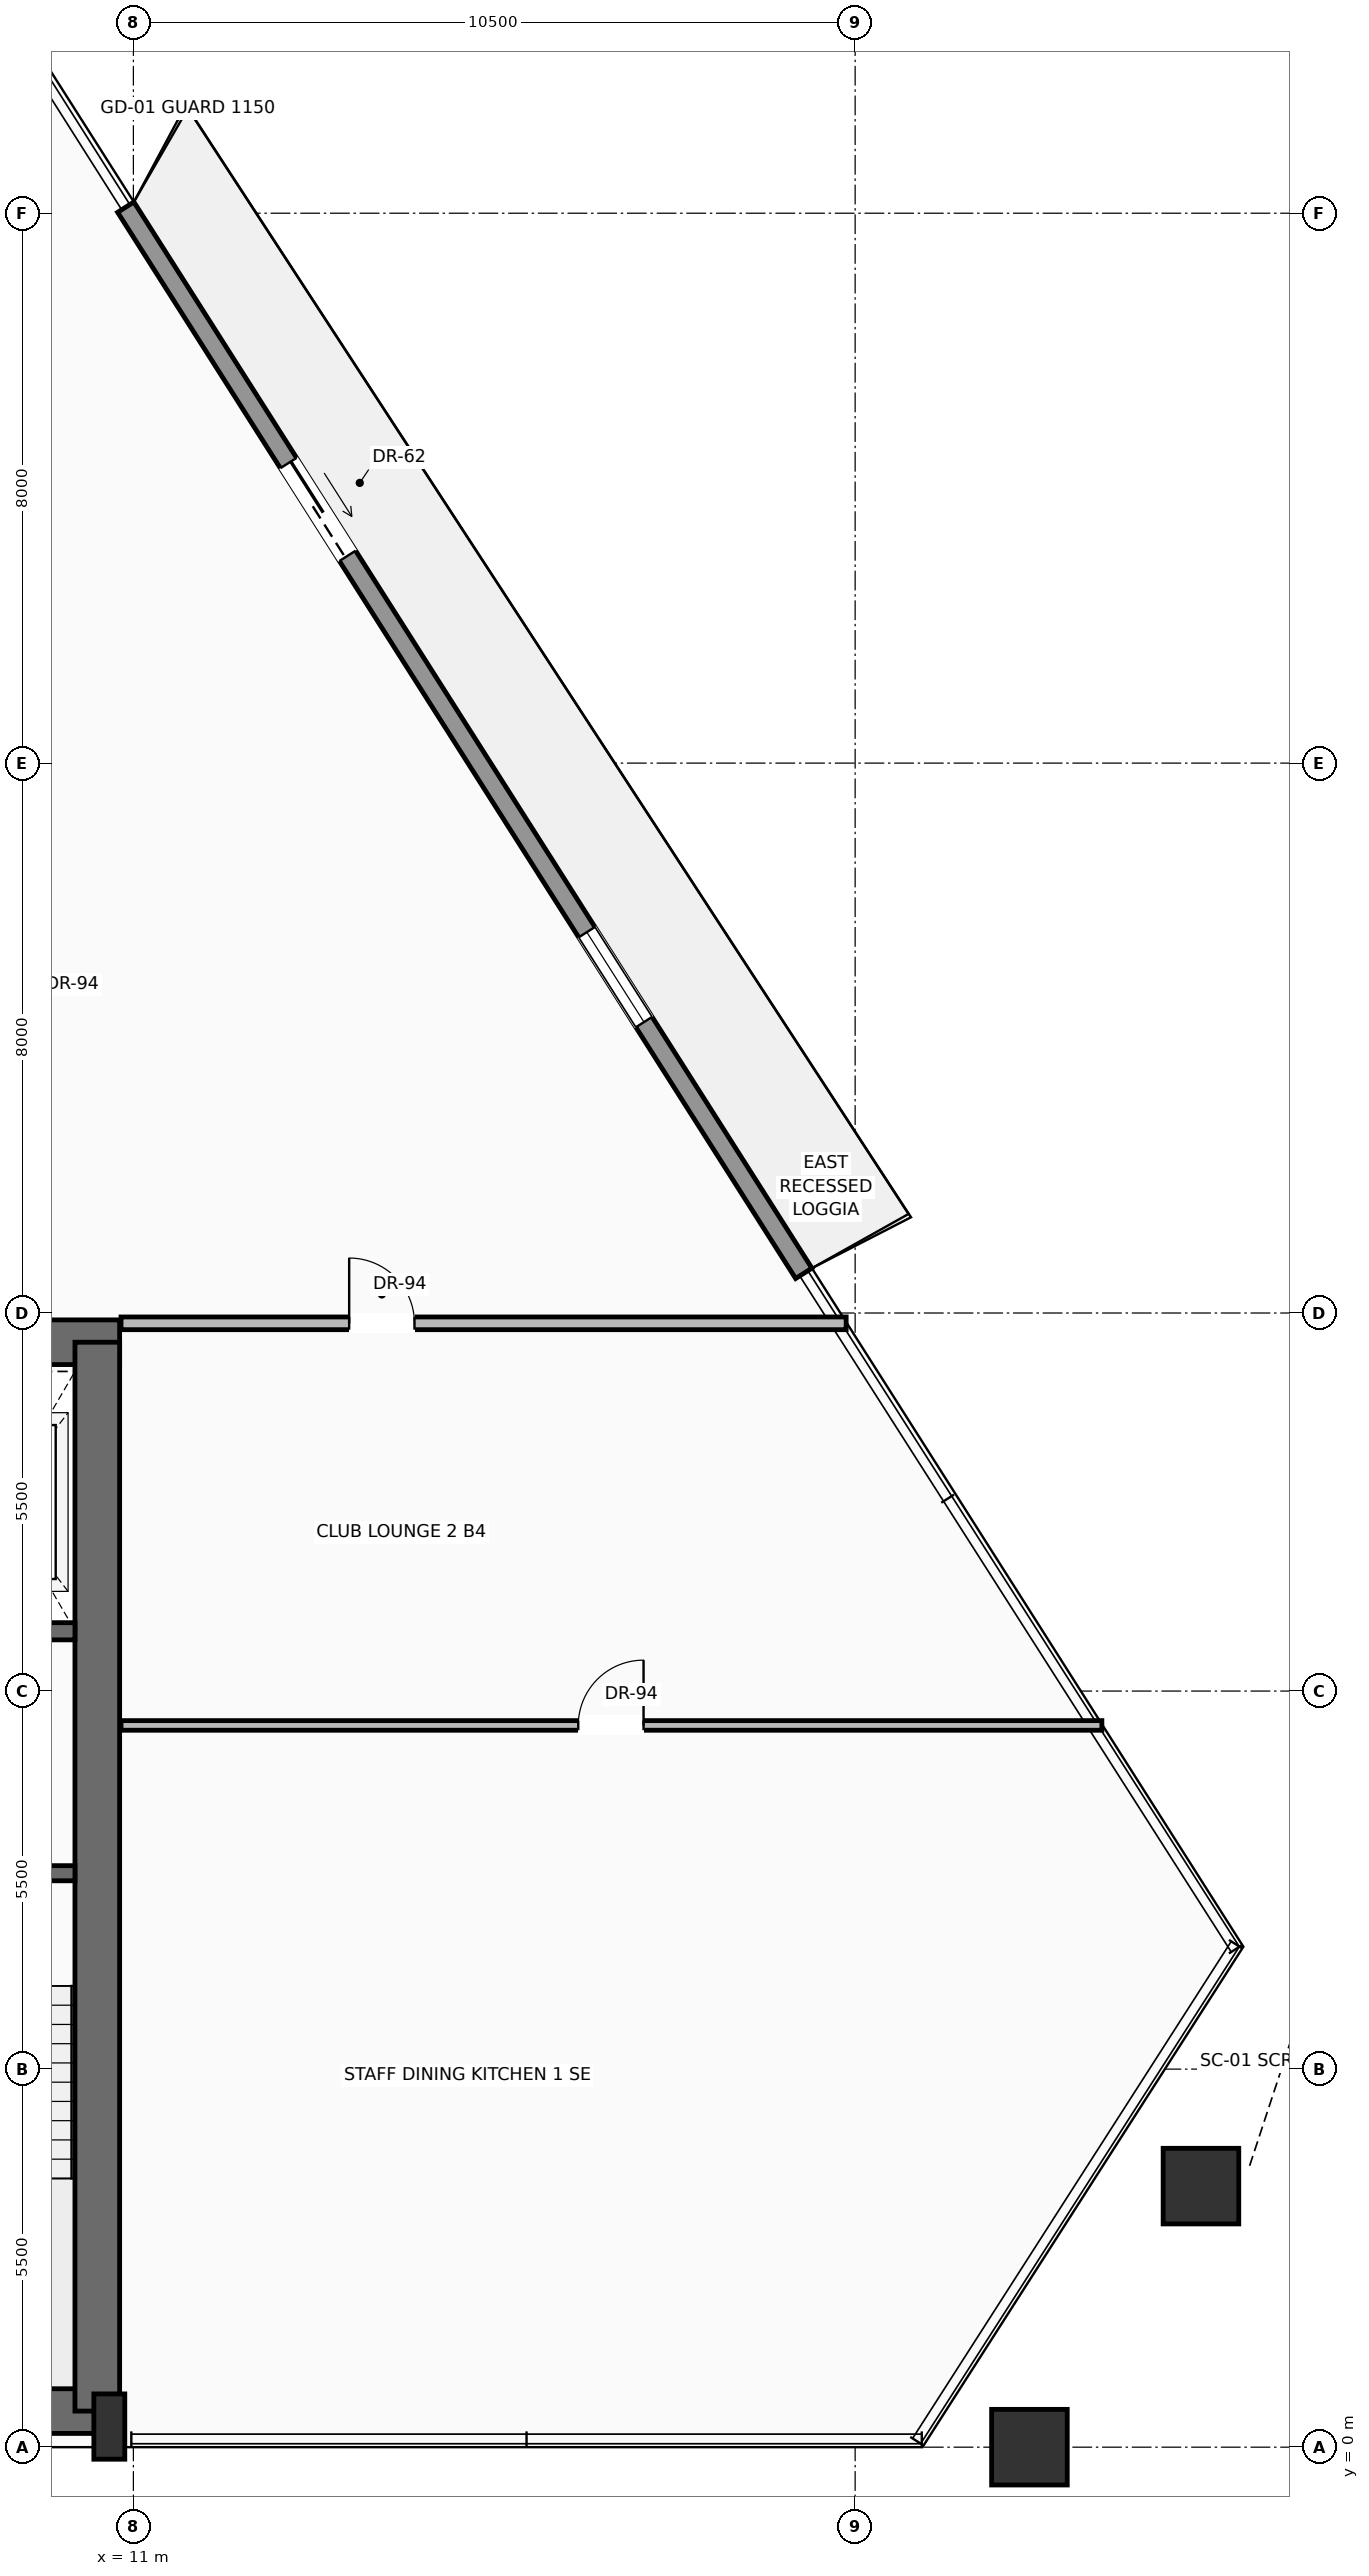
"""IFC4 building model, lengths in metres.
Left out: names, types, materials, properties, quantities, classifications, styles, units other than length and angle.
Written with IfcOpenShell. Run it as: python <this file> out.ifc"""

import sys

from ifc_helpers import new_model, si_unit, direction, frame, frame_2d, origin, origin_2d, place, context, subcontext, project, spatial, rectangle, hollow_rectangle, extrude, source, transform, mapped, element, fill, save


model = new_model("IFC4")
c1 = context("Model", 3, precision=1e-05, world=origin(), true_north=direction((0.0, 1.0)))
c2 = subcontext(c1, "Body", "Model", "MODEL_VIEW")
j1 = project(units=[si_unit("LENGTHUNIT", "METRE"), si_unit("PLANEANGLEUNIT", "RADIAN")], contexts=[c1])
p1 = place(None, origin())
s1 = spatial("IfcSite", under=j1, at=p1, CompositionType="ELEMENT")
p2 = place(p1, origin())
s2 = spatial("IfcBuilding", under=s1, at=p2, CompositionType="ELEMENT")
p3 = place(p2, frame((0.0, 0.0, 155.2)))
s3 = spatial("IfcBuildingStorey", under=s2, at=p3, CompositionType="ELEMENT", Elevation=155.2)
p4 = place(p3, frame((-10.65, 0.525, 0.0), z_axis=(0.0, 0.0, 1.0), x_axis=(1.0, 0.0, 0.0)))
e1 = element("IfcWall", 1, at=p4, inside=s3, PredefinedType="SHEAR", context=c2, shape_type="SweptSolid", body=[
    extrude(rectangle(XDim=21.3, YDim=0.65, at=frame_2d((10.65, 0.0))), origin(), (0.0, 0.0, 1.0), 3.47),
])
p5 = place(p3, frame((-10.8, 16.075, 0.0), z_axis=(0.0, 0.0, 1.0), x_axis=(1.0, 0.0, 0.0)))
e2 = element("IfcWall", 2, at=p5, inside=s3, PredefinedType="SHEAR", context=c2, shape_type="SweptSolid", body=[
    extrude(rectangle(XDim=21.6, YDim=0.65, at=frame_2d((10.8, 0.0))), origin(), (0.0, 0.0, 1.0), 3.47),
])
p6 = place(p5, frame((3.37, 0.0, 0.0)))
e3 = element("IfcOpeningElement", 3, at=p6, cuts=e2, PredefinedType="OPENING", context=c2, shape_type="SweptSolid", body=[
    extrude(rectangle(XDim=1.3, YDim=2.3, at=frame_2d((0.65, 1.15))), frame((0.0, 0.335, 0.0), z_axis=(0.0, -1.0, 0.0), x_axis=(1.0, 0.0, 0.0)), (0.0, 0.0, 1.0), 0.67),
])
p7 = place(p5, frame((9.8, 0.0, 0.0)))
e4 = element("IfcOpeningElement", 4, at=p7, cuts=e2, PredefinedType="OPENING", context=c2, shape_type="SweptSolid", body=[
    extrude(rectangle(XDim=2.0, YDim=2.4, at=frame_2d((1.0, 1.2))), frame((0.0, 0.335, 0.0), z_axis=(0.0, -1.0, 0.0), x_axis=(1.0, 0.0, 0.0)), (0.0, 0.0, 1.0), 0.67),
])
p8 = place(p3, frame((10.475, 0.525, 0.0), z_axis=(0.0, 0.0, 1.0), x_axis=(0.0, 1.0, 0.0)))
e5 = element("IfcWall", 5, at=p8, inside=s3, PredefinedType="SHEAR", context=c2, shape_type="SweptSolid", body=[
    extrude(rectangle(XDim=15.55, YDim=0.65, at=frame_2d((7.775, 0.0))), origin(), (0.0, 0.0, 1.0), 3.47),
])
m1 = source(origin(), c2, "Body", "SweptSolid", [
    extrude(rectangle(XDim=0.45, YDim=0.95, at=origin_2d()), origin(), (0.0, 0.0, 1.0), 3.7),
])
p9 = place(p3, frame((10.65, 0.3, 0.0), z_axis=(0.0, 0.0, 1.0), x_axis=(1.0, 0.0, 0.0)))
e6 = element("IfcColumn", 6, at=p9, inside=s3, PredefinedType="PILASTER", context=c2, shape_type="MappedRepresentation", body=[
    mapped(m1, transform((0.0, 0.0, 0.0), scale=1.0)),
])
m2 = source(origin(), c2, "Body", "SweptSolid", [
    extrude(hollow_rectangle(XDim=1.1, YDim=1.1, WallThickness=0.055, at=origin_2d()), origin(), (0.0, 0.0, 1.0), 3.691),
])
p10 = place(p3, frame((24.035, 0.0, 0.004), z_axis=(0.007672239294, 0.0, 0.999970567939), x_axis=(0.0, 1.0, 0.0)))
e7 = element("IfcColumn", 7, at=p10, inside=s3, PredefinedType="COLUMN", context=c2, shape_type="MappedRepresentation", body=[
    mapped(m2, transform((0.0, 0.0, 0.0), scale=1.0)),
])
m3 = source(origin(), c2, "Body", "SweptSolid", [
    extrude(hollow_rectangle(XDim=1.1, YDim=1.1, WallThickness=0.055, at=origin_2d()), origin(), (0.0, 0.0, 1.0), 3.692),
])
p11 = place(p3, frame((26.531, 3.798, 0.004), z_axis=(-0.004629359862, -0.015078486406, 0.999875596399), x_axis=(0.955960137676, -0.293496533497, 0.0)))
e8 = element("IfcColumn", 8, at=p11, inside=s3, PredefinedType="COLUMN", context=c2, shape_type="MappedRepresentation", body=[
    mapped(m3, transform((0.0, 0.0, 0.0), scale=1.0)),
])
p12 = place(p3, frame((10.889, 32.588, 0.0), z_axis=(0.0, 0.0, 1.0), x_axis=(0.536603894372, -0.8438342613, 0.0)))
e9 = element("IfcWall", 9, at=p12, inside=s3, PredefinedType="SOLIDWALL", context=c2, shape_type="SweptSolid", body=[
    extrude(rectangle(XDim=18.382, YDim=0.28, at=frame_2d((9.191, 0.0))), origin(), (0.0, 0.0, 1.0), 3.05),
])
p13 = place(p12, frame((4.412, 0.0, 0.0)))
e10 = element("IfcOpeningElement", 10, at=p13, cuts=e9, PredefinedType="OPENING", context=c2, shape_type="SweptSolid", body=[
    extrude(rectangle(XDim=1.6, YDim=2.35, at=frame_2d((0.8, 1.175))), frame((0.0, 0.15, 0.0), z_axis=(0.0, -1.0, 0.0), x_axis=(1.0, 0.0, 0.0)), (0.0, 0.0, 1.0), 0.3),
])
p14 = place(p12, frame((12.5, 0.0, 0.9)))
e11 = element("IfcOpeningElement", 11, at=p14, cuts=e9, PredefinedType="OPENING", context=c2, shape_type="SweptSolid", body=[
    extrude(rectangle(XDim=1.55, YDim=1.85, at=frame_2d((0.775, 0.925))), frame((0.0, 0.15, 0.0), z_axis=(0.0, -1.0, 0.0), x_axis=(1.0, 0.0, 0.0)), (0.0, 0.0, 1.0), 0.3),
])
p15 = place(p3, frame((10.15, 8.35, 0.0), z_axis=(0.0, 0.0, 1.0), x_axis=(-1.0, 0.0, 0.0)))
e12 = element("IfcWall", 12, at=p15, inside=s3, PredefinedType="SOLIDWALL", context=c2, shape_type="SweptSolid", body=[
    extrude(rectangle(XDim=4.65, YDim=0.22, at=frame_2d((2.325, 0.0))), origin(), (0.0, 0.0, 1.0), 3.47),
])
p16 = place(p15, frame((1.0, 0.0, 0.0)))
e13 = element("IfcOpeningElement", 13, at=p16, cuts=e12, PredefinedType="OPENING", context=c2, shape_type="SweptSolid", body=[
    extrude(rectangle(XDim=1.15, YDim=2.2, at=frame_2d((0.575, 1.1))), frame((0.0, 0.12, 0.0), z_axis=(0.0, -1.0, 0.0), x_axis=(1.0, 0.0, 0.0)), (0.0, 0.0, 1.0), 0.24),
])
p17 = place(p3, frame((10.15, 11.87, 0.0), z_axis=(0.0, 0.0, 1.0), x_axis=(-1.0, 0.0, 0.0)))
e14 = element("IfcWall", 14, at=p17, inside=s3, PredefinedType="SOLIDWALL", context=c2, shape_type="SweptSolid", body=[
    extrude(rectangle(XDim=4.65, YDim=0.25, at=frame_2d((2.325, 0.0))), origin(), (0.0, 0.0, 1.0), 3.47),
])
p18 = place(p17, frame((0.5, 0.0, 0.0)))
e15 = element("IfcOpeningElement", 15, at=p18, cuts=e14, PredefinedType="OPENING", context=c2, shape_type="SweptSolid", body=[
    extrude(rectangle(XDim=1.2, YDim=2.25, at=frame_2d((0.6, 1.125))), frame((0.0, 0.135, 0.0), z_axis=(0.0, -1.0, 0.0), x_axis=(1.0, 0.0, 0.0)), (0.0, 0.0, 1.0), 0.27),
])
p19 = place(p3, frame((10.82, 16.35, 0.0), z_axis=(0.0, 0.0, 1.0), x_axis=(1.0, 0.0, 0.0)))
e16 = element("IfcWall", 16, at=p19, inside=s3, PredefinedType="PARTITIONING", context=c2, shape_type="SweptSolid", body=[
    extrude(rectangle(XDim=10.549, YDim=0.185, at=frame_2d((5.274, 0.0))), origin(), (0.0, 0.0, 1.0), 3.462),
])
p20 = place(p19, frame((3.319, 0.0, 0.0)))
e17 = element("IfcOpeningElement", 17, at=p20, cuts=e16, PredefinedType="OPENING", context=c2, shape_type="SweptSolid", body=[
    extrude(rectangle(XDim=0.95, YDim=2.2, at=frame_2d((0.475, 1.1))), frame((0.0, 0.103, 0.0), z_axis=(0.0, -1.0, 0.0), x_axis=(1.0, 0.0, 0.0)), (0.0, 0.0, 1.0), 0.205),
])
p21 = place(p3, frame((10.82, 10.5, 0.0), z_axis=(0.0, 0.0, 1.0), x_axis=(1.0, 0.0, 0.0)))
e18 = element("IfcWall", 18, at=p21, inside=s3, PredefinedType="PARTITIONING", context=c2, shape_type="SweptSolid", body=[
    extrude(rectangle(XDim=14.269, YDim=0.14, at=frame_2d((7.135, 0.0))), origin(), (0.0, 0.0, 1.0), 3.462),
])
p22 = place(p21, frame((6.652, 0.0, 0.0)))
e19 = element("IfcOpeningElement", 19, at=p22, cuts=e18, PredefinedType="OPENING", context=c2, shape_type="SweptSolid", body=[
    extrude(rectangle(XDim=0.95, YDim=2.2, at=frame_2d((0.475, 1.1))), frame((0.0, 0.08, 0.0), z_axis=(0.0, -1.0, 0.0), x_axis=(1.0, 0.0, 0.0)), (0.0, 0.0, 1.0), 0.16),
])
m4 = source(origin(), c2, "Body", "SweptSolid", [
    extrude(rectangle(XDim=1.6, YDim=2.35, at=frame_2d((0.8, 1.175))), frame((0.0, 0.025, 0.0), z_axis=(0.0, -1.0, 0.0), x_axis=(1.0, 0.0, 0.0)), (0.0, 0.0, 1.0), 0.05),
])
p23 = place(p13, origin())
e20 = element("IfcDoor", 20, at=p23, inside=s3, OperationType="SLIDING_TO_RIGHT", PredefinedType="DOOR", context=c2, shape_type="MappedRepresentation", body=[
    mapped(m4, transform((0.0, 0.0, 0.0), scale=1.0)),
])
fill(e10, e20)
m5 = source(origin(), c2, "Body", "SweptSolid", [
    extrude(rectangle(XDim=1.55, YDim=1.85, at=frame_2d((0.775, 0.925))), frame((0.0, 0.03, 0.0), z_axis=(0.0, -1.0, 0.0), x_axis=(1.0, 0.0, 0.0)), (0.0, 0.0, 1.0), 0.06),
])
p24 = place(p14, origin())
e21 = element("IfcWindow", 21, at=p24, inside=s3, PartitioningType="SINGLE_PANEL", PredefinedType="WINDOW", context=c2, shape_type="MappedRepresentation", body=[
    mapped(m5, transform((0.0, 0.0, 0.0), scale=1.0)),
])
fill(e11, e21)
m6 = source(origin(), c2, "Body", "SweptSolid", [
    extrude(rectangle(XDim=0.95, YDim=2.2, at=frame_2d((0.475, 1.1))), frame((0.0, 0.025, 0.0), z_axis=(0.0, -1.0, 0.0), x_axis=(1.0, 0.0, 0.0)), (0.0, 0.0, 1.0), 0.05),
])
p25 = place(p20, origin())
e22 = element("IfcDoor", 22, at=p25, inside=s3, OperationType="SINGLE_SWING_LEFT", PredefinedType="DOOR", context=c2, shape_type="MappedRepresentation", body=[
    mapped(m6, transform((0.0, 0.0, 0.0), scale=1.0)),
])
fill(e17, e22)
p26 = place(p22, origin())
e23 = element("IfcDoor", 23, at=p26, inside=s3, OperationType="SINGLE_SWING_RIGHT", PredefinedType="DOOR", context=c2, shape_type="MappedRepresentation", body=[
    mapped(m6, transform((0.0, 0.0, 0.0), scale=1.0)),
])
fill(e19, e23)
save(model, sys.argv[1])
